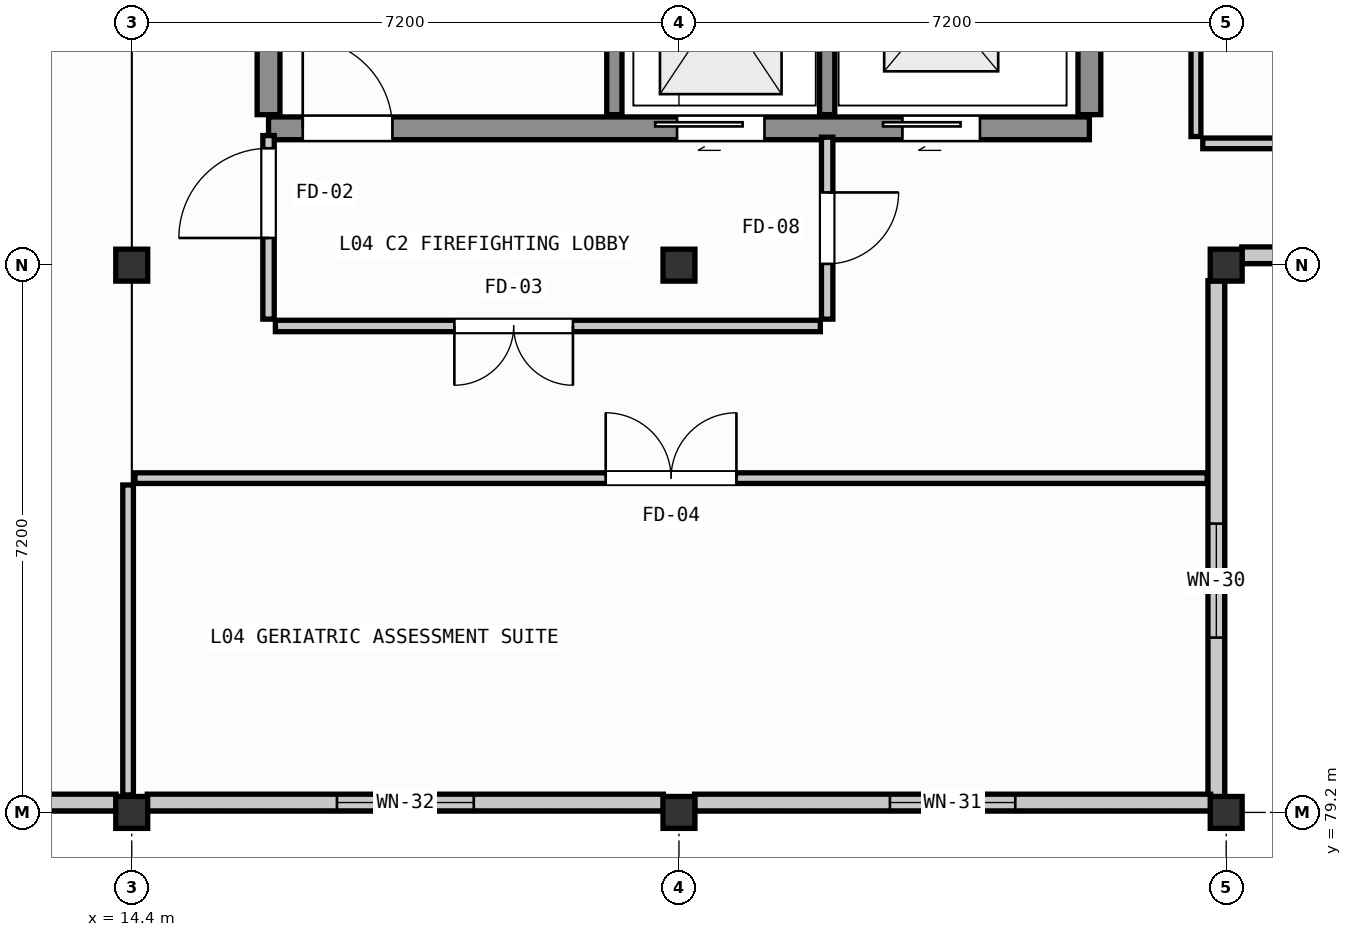
"""IFC4 building model, lengths in metres.
Left out: names, types, materials, properties, quantities, classifications, styles, units other than length and angle.
Written with IfcOpenShell. Run it as: python <this file> out.ifc"""

import sys

from ifc_helpers import new_model, si_unit, direction, frame, frame_2d, origin, origin_2d, place, context, subcontext, project, spatial, rectangle, extrude, element, fill, save


model = new_model("IFC4")
c1 = context("Model", 3, precision=1e-05, world=origin(), true_north=direction((0.0, 1.0)))
c2 = subcontext(c1, "Body", "Model", "MODEL_VIEW")
j1 = project(units=[si_unit("LENGTHUNIT", "METRE"), si_unit("PLANEANGLEUNIT", "RADIAN")], contexts=[c1])
p1 = place(None, origin())
s1 = spatial("IfcSite", under=j1, at=p1, CompositionType="ELEMENT")
p2 = place(p1, origin())
s2 = spatial("IfcBuilding", under=s1, at=p2, CompositionType="ELEMENT")
p3 = place(p2, frame((0.0, 0.0, 13.5)))
s3 = spatial("IfcBuildingStorey", under=s2, at=p3, CompositionType="ELEMENT", Elevation=13.5)
for number, where, z_axis, x_axis in (
    (1, (14.4, 79.2, 0.0), (0.0, 0.0, 1.0), (1.0, 0.0, 0.0)),
    (2, (14.4, 86.4, 0.0), (0.0, 0.0, 1.0), (1.0, 0.0, 0.0)),
    (3, (21.6, 79.2, 0.0), (0.0, 0.0, 1.0), (1.0, 0.0, 0.0)),
    (4, (21.6, 86.4, 0.0), (0.0, 0.0, 1.0), (1.0, 0.0, 0.0)),
    (5, (28.8, 79.2, 0.0), (0.0, 0.0, 1.0), (1.0, 0.0, 0.0)),
    (6, (28.8, 86.4, 0.0), (0.0, 0.0, 1.0), (1.0, 0.0, 0.0)),
):
    element("IfcColumn", number, at=place(p3, frame(where, z_axis=z_axis, x_axis=x_axis)), inside=s3, PredefinedType="COLUMN", context=c2, shape_type="SweptSolid", body=[
        extrude(rectangle(XDim=0.42, YDim=0.42, at=origin_2d()), origin(), (0.0, 0.0, 1.0), 3.99),
    ])
p4 = place(p3, frame((35.795, 86.53, 0.0), z_axis=(0.0, 0.0, 1.0), x_axis=(-1.0, 0.0, 0.0)))
e7 = element("IfcWall", 7, at=p4, inside=s3, PredefinedType="SOLIDWALL", context=c2, shape_type="SweptSolid", body=[
    extrude(rectangle(XDim=6.79, YDim=0.22, at=frame_2d((3.395, 0.0))), origin(), (0.0, 0.0, 1.0), 3.27),
])
p5 = place(p4, frame((2.72, 0.0, 0.95)))
e8 = element("IfcOpeningElement", 8, at=p5, cuts=e7, PredefinedType="OPENING", context=c2, shape_type="SweptSolid", body=[
    extrude(rectangle(XDim=1.35, YDim=1.25, at=frame_2d((0.675, 0.625))), frame((0.0, 0.12, 0.0), z_axis=(0.0, -1.0, 0.0), x_axis=(1.0, 0.0, 0.0)), (0.0, 0.0, 1.0), 0.24),
])
p6 = place(p3, frame((28.67, 86.195, 0.0), z_axis=(0.0, 0.0, 1.0), x_axis=(0.0, -1.0, 0.0)))
e9 = element("IfcWall", 9, at=p6, inside=s3, PredefinedType="SOLIDWALL", context=c2, shape_type="SweptSolid", body=[
    extrude(rectangle(XDim=6.79, YDim=0.22, at=frame_2d((3.395, 0.0))), origin(), (0.0, 0.0, 1.0), 3.27),
])
p7 = place(p6, frame((3.195, 0.0, 0.95)))
e10 = element("IfcOpeningElement", 10, at=p7, cuts=e9, PredefinedType="OPENING", context=c2, shape_type="SweptSolid", body=[
    extrude(rectangle(XDim=1.5, YDim=1.25, at=frame_2d((0.75, 0.625))), frame((0.0, 0.12, 0.0), z_axis=(0.0, -1.0, 0.0), x_axis=(1.0, 0.0, 0.0)), (0.0, 0.0, 1.0), 0.24),
])
p8 = place(p3, frame((28.595, 79.33, 0.0), z_axis=(0.0, 0.0, 1.0), x_axis=(-1.0, 0.0, 0.0)))
e11 = element("IfcWall", 11, at=p8, inside=s3, PredefinedType="SOLIDWALL", context=c2, shape_type="SweptSolid", body=[
    extrude(rectangle(XDim=6.79, YDim=0.22, at=frame_2d((3.395, 0.0))), origin(), (0.0, 0.0, 1.0), 3.27),
])
p9 = place(p8, frame((2.57, 0.0, 0.95)))
e12 = element("IfcOpeningElement", 12, at=p9, cuts=e11, PredefinedType="OPENING", context=c2, shape_type="SweptSolid", body=[
    extrude(rectangle(XDim=1.65, YDim=1.25, at=frame_2d((0.825, 0.625))), frame((0.0, 0.12, 0.0), z_axis=(0.0, -1.0, 0.0), x_axis=(1.0, 0.0, 0.0)), (0.0, 0.0, 1.0), 0.24),
])
p10 = place(p3, frame((21.395, 79.33, 0.0), z_axis=(0.0, 0.0, 1.0), x_axis=(-1.0, 0.0, 0.0)))
e13 = element("IfcWall", 13, at=p10, inside=s3, PredefinedType="SOLIDWALL", context=c2, shape_type="SweptSolid", body=[
    extrude(rectangle(XDim=6.79, YDim=0.22, at=frame_2d((3.395, 0.0))), origin(), (0.0, 0.0, 1.0), 3.27),
])
p11 = place(p10, frame((2.495, 0.0, 0.95)))
e14 = element("IfcOpeningElement", 14, at=p11, cuts=e13, PredefinedType="OPENING", context=c2, shape_type="SweptSolid", body=[
    extrude(rectangle(XDim=1.8, YDim=1.25, at=frame_2d((0.9, 0.625))), frame((0.0, 0.12, 0.0), z_axis=(0.0, -1.0, 0.0), x_axis=(1.0, 0.0, 0.0)), (0.0, 0.0, 1.0), 0.24),
])
p12 = place(p3, frame((14.195, 79.33, 0.0), z_axis=(0.0, 0.0, 1.0), x_axis=(-1.0, 0.0, 0.0)))
e15 = element("IfcWall", 15, at=p12, inside=s3, PredefinedType="SOLIDWALL", context=c2, shape_type="SweptSolid", body=[
    extrude(rectangle(XDim=6.995, YDim=0.22, at=frame_2d((3.498, 0.0))), origin(), (0.0, 0.0, 1.0), 3.35),
])
p13 = place(p12, frame((3.623, 0.0, 0.95)))
e16 = element("IfcOpeningElement", 16, at=p13, cuts=e15, PredefinedType="OPENING", context=c2, shape_type="SweptSolid", body=[
    extrude(rectangle(XDim=1.95, YDim=1.25, at=frame_2d((0.975, 0.625))), frame((0.0, 0.12, 0.0), z_axis=(0.0, -1.0, 0.0), x_axis=(1.0, 0.0, 0.0)), (0.0, 0.0, 1.0), 0.24),
])
p14 = place(p3, frame((16.2, 88.2, 0.0), z_axis=(0.0, 0.0, 1.0), x_axis=(1.0, 0.0, 0.0)))
e17 = element("IfcWall", 17, at=p14, inside=s3, PredefinedType="SHEAR", context=c2, shape_type="SweptSolid", body=[
    extrude(rectangle(XDim=10.8, YDim=0.3, at=frame_2d((5.4, 0.0))), origin(), (0.0, 0.0, 1.0), 4.2),
])
p15 = place(p14, frame((0.45, 0.0, 0.0)))
e18 = element("IfcOpeningElement", 18, at=p15, cuts=e17, PredefinedType="OPENING", context=c2, shape_type="SweptSolid", body=[
    extrude(rectangle(XDim=1.18, YDim=2.16, at=frame_2d((0.59, 1.08))), frame((0.0, 0.16, 0.0), z_axis=(0.0, -1.0, 0.0), x_axis=(1.0, 0.0, 0.0)), (0.0, 0.0, 1.0), 0.32),
])
p16 = place(p14, frame((5.375, 0.0, 0.0)))
e19 = element("IfcOpeningElement", 19, at=p16, cuts=e17, PredefinedType="OPENING", context=c2, shape_type="SweptSolid", body=[
    extrude(rectangle(XDim=1.15, YDim=2.15, at=frame_2d((0.575, 1.075))), frame((0.0, 0.16, 0.0), z_axis=(0.0, -1.0, 0.0), x_axis=(1.0, 0.0, 0.0)), (0.0, 0.0, 1.0), 0.32),
])
p17 = place(p14, frame((8.34, 0.0, 0.0)))
e20 = element("IfcOpeningElement", 20, at=p17, cuts=e17, PredefinedType="OPENING", context=c2, shape_type="SweptSolid", body=[
    extrude(rectangle(XDim=1.02, YDim=2.12, at=frame_2d((0.51, 1.06))), frame((0.0, 0.16, 0.0), z_axis=(0.0, -1.0, 0.0), x_axis=(1.0, 0.0, 0.0)), (0.0, 0.0, 1.0), 0.32),
])
for number, where, z_axis, x_axis in (
    (21, (16.2, 88.38, 0.0), (0.0, 0.0, 1.0), (0.0, 1.0, 0.0)),
    (22, (27.0, 88.38, 0.0), (0.0, 0.0, 1.0), (0.0, 1.0, 0.0)),
):
    element("IfcWall", number, at=place(p3, frame(where, z_axis=z_axis, x_axis=x_axis)), inside=s3, PredefinedType="SHEAR", context=c2, shape_type="SweptSolid", body=[
        extrude(rectangle(XDim=6.24, YDim=0.3, at=frame_2d((3.12, 0.0))), origin(), (0.0, 0.0, 1.0), 4.2),
    ])
for number, where, z_axis, x_axis in (
    (23, (20.75, 88.38, 0.0), (0.0, 0.0, 1.0), (0.0, 1.0, 0.0)),
    (24, (23.55, 88.38, 0.0), (0.0, 0.0, 1.0), (0.0, 1.0, 0.0)),
):
    element("IfcWall", number, at=place(p3, frame(where, z_axis=z_axis, x_axis=x_axis)), inside=s3, PredefinedType="SHEAR", context=c2, shape_type="SweptSolid", body=[
        extrude(rectangle(XDim=3.15, YDim=0.2, at=frame_2d((1.575, 0.0))), origin(), (0.0, 0.0, 1.0), 4.2),
    ])
p18 = place(p3, frame((16.2, 85.69, 0.0), z_axis=(0.0, 0.0, 1.0), x_axis=(0.0, 1.0, 0.0)))
e25 = element("IfcWall", 25, at=p18, inside=s3, PredefinedType="PARTITIONING", context=c2, shape_type="SweptSolid", body=[
    extrude(rectangle(XDim=2.415, YDim=0.15, at=frame_2d((1.208, 0.0))), origin(), (0.0, 0.0, 1.0), 3.27),
])
p19 = place(p18, frame((1.067, 0.0, 0.0)))
e26 = element("IfcOpeningElement", 26, at=p19, cuts=e25, PredefinedType="OPENING", context=c2, shape_type="SweptSolid", body=[
    extrude(rectangle(XDim=1.18, YDim=2.16, at=frame_2d((0.59, 1.08))), frame((0.0, 0.085, 0.0), z_axis=(0.0, -1.0, 0.0), x_axis=(1.0, 0.0, 0.0)), (0.0, 0.0, 1.0), 0.17),
])
p20 = place(p3, frame((23.55, 88.083, 0.0), z_axis=(0.0, 0.0, 1.0), x_axis=(0.0, -1.0, 0.0)))
e27 = element("IfcWall", 27, at=p20, inside=s3, PredefinedType="PARTITIONING", context=c2, shape_type="SweptSolid", body=[
    extrude(rectangle(XDim=2.393, YDim=0.15, at=frame_2d((1.197, 0.0))), origin(), (0.0, 0.0, 1.0), 3.27),
])
p21 = place(p20, frame((0.727, 0.0, 0.0)))
e28 = element("IfcOpeningElement", 28, at=p21, cuts=e27, PredefinedType="OPENING", context=c2, shape_type="SweptSolid", body=[
    extrude(rectangle(XDim=0.94, YDim=2.1, at=frame_2d((0.47, 1.05))), frame((0.0, 0.085, 0.0), z_axis=(0.0, -1.0, 0.0), x_axis=(1.0, 0.0, 0.0)), (0.0, 0.0, 1.0), 0.17),
])
p22 = place(p3, frame((23.46, 85.6, 0.0), z_axis=(0.0, 0.0, 1.0), x_axis=(-1.0, 0.0, 0.0)))
e29 = element("IfcWall", 29, at=p22, inside=s3, PredefinedType="PARTITIONING", context=c2, shape_type="SweptSolid", body=[
    extrude(rectangle(XDim=7.17, YDim=0.15, at=frame_2d((3.585, 0.0))), origin(), (0.0, 0.0, 1.0), 3.35),
])
p23 = place(p22, frame((3.255, 0.0, 0.0)))
e30 = element("IfcOpeningElement", 30, at=p23, cuts=e29, PredefinedType="OPENING", context=c2, shape_type="SweptSolid", body=[
    extrude(rectangle(XDim=1.56, YDim=2.22, at=frame_2d((0.78, 1.11))), frame((0.0, 0.085, 0.0), z_axis=(0.0, -1.0, 0.0), x_axis=(1.0, 0.0, 0.0)), (0.0, 0.0, 1.0), 0.17),
])
p24 = place(p3, frame((14.352, 79.43, 0.0), z_axis=(0.0, 0.0, 1.0), x_axis=(0.0, 1.0, 0.0)))
e31 = element("IfcWall", 31, at=p24, inside=s3, PredefinedType="PARTITIONING", context=c2, shape_type="SweptSolid", body=[
    extrude(rectangle(XDim=4.078, YDim=0.14, at=frame_2d((2.039, 0.0))), origin(), (0.0, 0.0, 1.0), 3.27),
])
p25 = place(p3, frame((14.442, 83.598, 0.0), z_axis=(0.0, 0.0, 1.0), x_axis=(1.0, 0.0, 0.0)))
e32 = element("IfcWall", 32, at=p25, inside=s3, PredefinedType="PARTITIONING", context=c2, shape_type="SweptSolid", body=[
    extrude(rectangle(XDim=14.108, YDim=0.14, at=frame_2d((7.054, 0.0))), origin(), (0.0, 0.0, 1.0), 3.35),
])
p26 = place(p25, frame((6.194, 0.0, 0.0)))
e33 = element("IfcOpeningElement", 33, at=p26, cuts=e32, PredefinedType="OPENING", context=c2, shape_type="SweptSolid", body=[
    extrude(rectangle(XDim=1.72, YDim=2.26, at=frame_2d((0.86, 1.13))), frame((0.0, 0.08, 0.0), z_axis=(0.0, -1.0, 0.0), x_axis=(1.0, 0.0, 0.0)), (0.0, 0.0, 1.0), 0.16),
])
p27 = place(p3, frame((35.75, 88.002, 0.0), z_axis=(0.0, 0.0, 1.0), x_axis=(-1.0, 0.0, 0.0)))
e34 = element("IfcWall", 34, at=p27, inside=s3, PredefinedType="PARTITIONING", context=c2, shape_type="SweptSolid", body=[
    extrude(rectangle(XDim=7.258, YDim=0.14, at=frame_2d((3.629, 0.0))), origin(), (0.0, 0.0, 1.0), 3.35),
])
p28 = place(p27, frame((2.969, 0.0, 0.0)))
e35 = element("IfcOpeningElement", 35, at=p28, cuts=e34, PredefinedType="OPENING", context=c2, shape_type="SweptSolid", body=[
    extrude(rectangle(XDim=1.32, YDim=2.2, at=frame_2d((0.66, 1.1))), frame((0.0, 0.08, 0.0), z_axis=(0.0, -1.0, 0.0), x_axis=(1.0, 0.0, 0.0)), (0.0, 0.0, 1.0), 0.16),
])
p29 = place(p3, frame((28.402, 88.092, 0.0), z_axis=(0.0, 0.0, 1.0), x_axis=(-0.00012614936, 0.999999992043, 0.0)))
e36 = element("IfcWall", 36, at=p29, inside=s3, PredefinedType="PARTITIONING", context=c2, shape_type="SweptSolid", body=[
    extrude(rectangle(XDim=17.418, YDim=0.13, at=frame_2d((8.709, 0.0))), origin(), (0.0, 0.0, 1.0), 3.97),
])
p30 = place(p7, origin())
e37 = element("IfcWindow", 37, at=p30, inside=s3, PartitioningType="SINGLE_PANEL", PredefinedType="WINDOW", context=c2, shape_type="SweptSolid", body=[
    extrude(rectangle(XDim=1.5, YDim=1.25, at=frame_2d((0.75, 0.625))), frame((0.0, 0.03, 0.0), z_axis=(0.0, -1.0, 0.0), x_axis=(1.0, 0.0, 0.0)), (0.0, 0.0, 1.0), 0.06),
])
fill(e10, e37)
p31 = place(p9, origin())
e38 = element("IfcWindow", 38, at=p31, inside=s3, PartitioningType="SINGLE_PANEL", PredefinedType="WINDOW", context=c2, shape_type="SweptSolid", body=[
    extrude(rectangle(XDim=1.65, YDim=1.25, at=frame_2d((0.825, 0.625))), frame((0.0, 0.03, 0.0), z_axis=(0.0, -1.0, 0.0), x_axis=(1.0, 0.0, 0.0)), (0.0, 0.0, 1.0), 0.06),
])
fill(e12, e38)
p32 = place(p11, origin())
e39 = element("IfcWindow", 39, at=p32, inside=s3, PartitioningType="SINGLE_PANEL", PredefinedType="WINDOW", context=c2, shape_type="SweptSolid", body=[
    extrude(rectangle(XDim=1.8, YDim=1.25, at=frame_2d((0.9, 0.625))), frame((0.0, 0.03, 0.0), z_axis=(0.0, -1.0, 0.0), x_axis=(1.0, 0.0, 0.0)), (0.0, 0.0, 1.0), 0.06),
])
fill(e14, e39)
p33 = place(p15, origin())
e40 = element("IfcDoor", 40, at=p33, inside=s3, OperationType="SINGLE_SWING_LEFT", PredefinedType="DOOR", context=c2, shape_type="SweptSolid", body=[
    extrude(rectangle(XDim=1.18, YDim=2.16, at=frame_2d((0.59, 1.08))), frame((0.0, 0.025, 0.0), z_axis=(0.0, -1.0, 0.0), x_axis=(1.0, 0.0, 0.0)), (0.0, 0.0, 1.0), 0.05),
])
fill(e18, e40)
p34 = place(p16, origin())
e41 = element("IfcDoor", 41, at=p34, inside=s3, OperationType="DOUBLE_DOOR_SLIDING", PredefinedType="DOOR", context=c2, shape_type="SweptSolid", body=[
    extrude(rectangle(XDim=1.15, YDim=2.15, at=frame_2d((0.575, 1.075))), frame((0.0, 0.025, 0.0), z_axis=(0.0, -1.0, 0.0), x_axis=(1.0, 0.0, 0.0)), (0.0, 0.0, 1.0), 0.05),
])
fill(e19, e41)
p35 = place(p17, origin())
e42 = element("IfcDoor", 42, at=p35, inside=s3, OperationType="SLIDING_TO_LEFT", PredefinedType="DOOR", context=c2, shape_type="SweptSolid", body=[
    extrude(rectangle(XDim=1.02, YDim=2.12, at=frame_2d((0.51, 1.06))), frame((0.0, 0.025, 0.0), z_axis=(0.0, -1.0, 0.0), x_axis=(1.0, 0.0, 0.0)), (0.0, 0.0, 1.0), 0.05),
])
fill(e20, e42)
p36 = place(p19, origin())
e43 = element("IfcDoor", 43, at=p36, inside=s3, OperationType="SINGLE_SWING_RIGHT", PredefinedType="DOOR", context=c2, shape_type="SweptSolid", body=[
    extrude(rectangle(XDim=1.18, YDim=2.16, at=frame_2d((0.59, 1.08))), frame((0.0, 0.025, 0.0), z_axis=(0.0, -1.0, 0.0), x_axis=(1.0, 0.0, 0.0)), (0.0, 0.0, 1.0), 0.05),
])
fill(e26, e43)
p37 = place(p21, origin())
e44 = element("IfcDoor", 44, at=p37, inside=s3, OperationType="SINGLE_SWING_LEFT", PredefinedType="DOOR", context=c2, shape_type="SweptSolid", body=[
    extrude(rectangle(XDim=0.94, YDim=2.1, at=frame_2d((0.47, 1.05))), frame((0.0, 0.025, 0.0), z_axis=(0.0, -1.0, 0.0), x_axis=(1.0, 0.0, 0.0)), (0.0, 0.0, 1.0), 0.05),
])
fill(e28, e44)
p38 = place(p23, origin())
e45 = element("IfcDoor", 45, at=p38, inside=s3, OperationType="DOUBLE_DOOR_SINGLE_SWING", PredefinedType="DOOR", context=c2, shape_type="SweptSolid", body=[
    extrude(rectangle(XDim=1.56, YDim=2.22, at=frame_2d((0.78, 1.11))), frame((0.0, 0.025, 0.0), z_axis=(0.0, -1.0, 0.0), x_axis=(1.0, 0.0, 0.0)), (0.0, 0.0, 1.0), 0.05),
])
fill(e30, e45)
p39 = place(p26, origin())
e46 = element("IfcDoor", 46, at=p39, inside=s3, OperationType="DOUBLE_DOOR_SINGLE_SWING", PredefinedType="DOOR", context=c2, shape_type="SweptSolid", body=[
    extrude(rectangle(XDim=1.72, YDim=2.26, at=frame_2d((0.86, 1.13))), frame((0.0, 0.025, 0.0), z_axis=(0.0, -1.0, 0.0), x_axis=(1.0, 0.0, 0.0)), (0.0, 0.0, 1.0), 0.05),
])
fill(e33, e46)
save(model, sys.argv[1])
